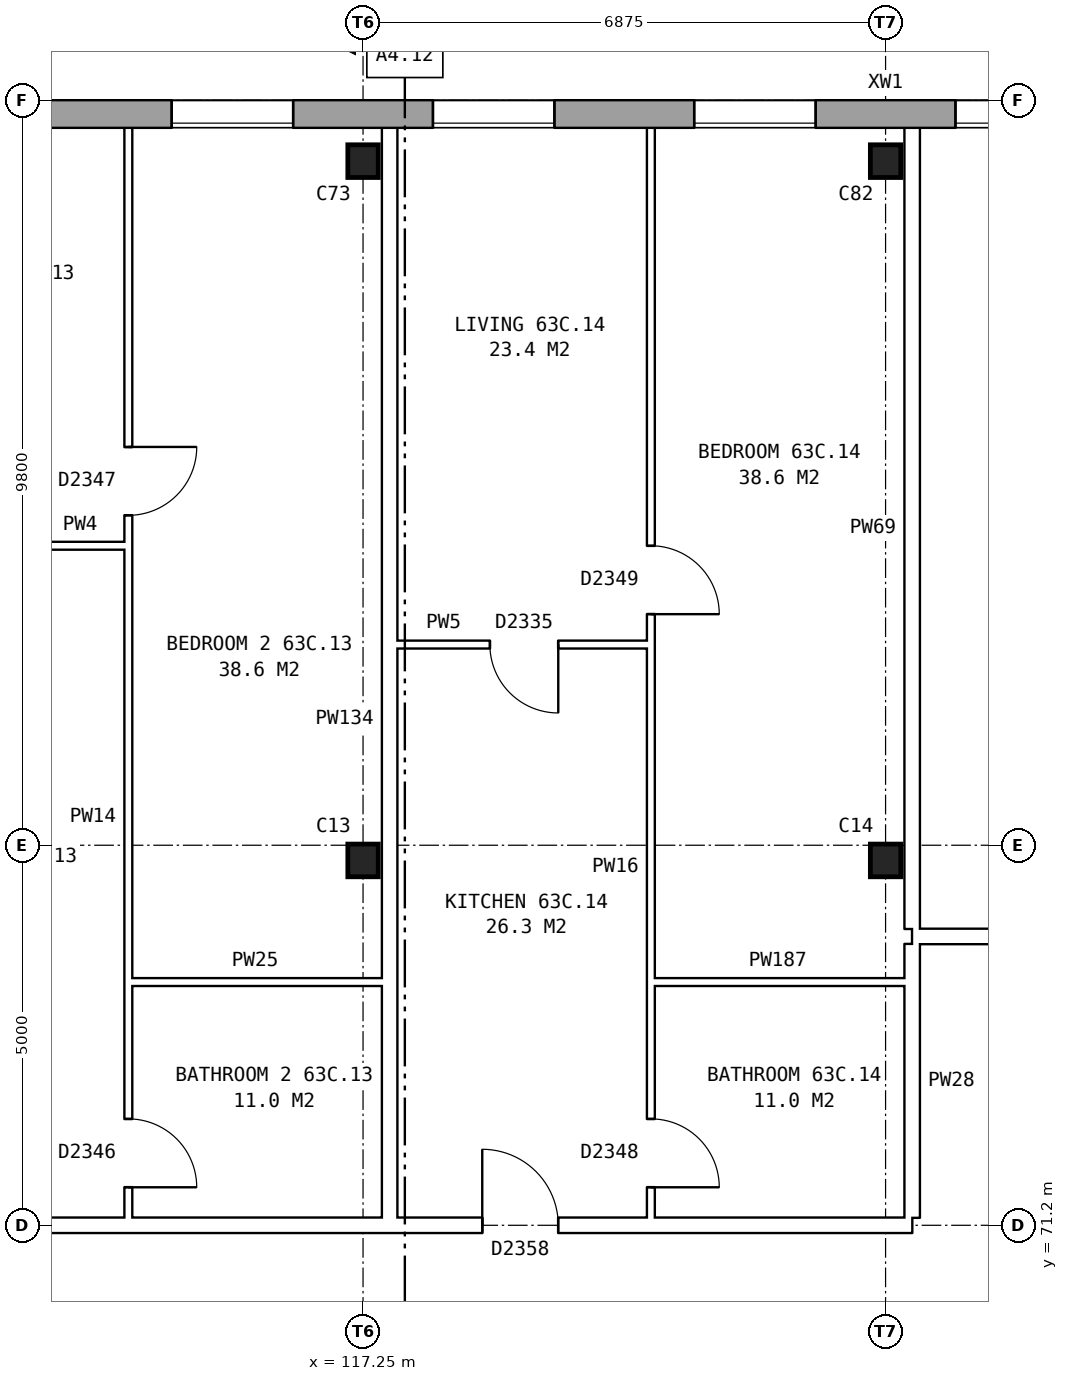
"""IFC4 building model, lengths in metres.
Left out: names, types, materials, properties, quantities, classifications, styles, units other than length and angle.
Written with IfcOpenShell. Run it as: python <this file> out.ifc"""

import sys

from ifc_helpers import new_model, si_unit, direction, frame, frame_2d, origin, origin_2d, place, context, subcontext, project, spatial, rectangle, i_section, extrude, element, fill, save


model = new_model("IFC4")
c1 = context("Model", 3, precision=1e-05, world=origin(), true_north=direction((0.0, 1.0)))
c2 = subcontext(c1, "Body", "Model", "MODEL_VIEW")
j1 = project(units=[si_unit("LENGTHUNIT", "METRE"), si_unit("PLANEANGLEUNIT", "RADIAN")], contexts=[c1])
p1 = place(None, origin())
s1 = spatial("IfcSite", under=j1, at=p1, CompositionType="ELEMENT")
p2 = place(p1, origin())
s2 = spatial("IfcBuilding", under=s1, at=p2, CompositionType="ELEMENT")
p3 = place(p2, frame((0.0, 0.0, 224.5)))
s3 = spatial("IfcBuildingStorey", under=s2, at=p3, CompositionType="ELEMENT", Elevation=224.5)
for number, where, z_axis, x_axis in (
    (1, (117.25, 76.0, 0.0), (0.0, 0.0, 1.0), (1.0, 0.0, 0.0)),
    (2, (124.125, 76.0, 0.0), (0.0, 0.0, 1.0), (1.0, 0.0, 0.0)),
    (3, (117.25, 85.2, 0.0), (0.0, 0.0, 1.0), (1.0, 0.0, 0.0)),
    (4, (124.125, 85.2, 0.0), (0.0, 0.0, 1.0), (1.0, 0.0, 0.0)),
):
    element("IfcColumn", number, at=place(p3, frame(where, z_axis=z_axis, x_axis=x_axis)), inside=s3, PredefinedType="COLUMN", context=c2, shape_type="SweptSolid", body=[
        extrude(i_section(OverallWidth=0.4, OverallDepth=0.43, WebThickness=0.04, FlangeThickness=0.04, at=origin_2d()), origin(), (0.0, 0.0, 1.0), 2.85),
    ])
p4 = place(p3, frame((131.05, 85.82, 0.0), z_axis=(0.0, 0.0, 1.0), x_axis=(-1.0, 0.0, 0.0)))
e5 = element("IfcWall", 5, at=p4, inside=s3, PredefinedType="STANDARD", context=c2, shape_type="SweptSolid", body=[
    extrude(rectangle(XDim=55.1, YDim=0.36, at=frame_2d((27.55, 0.0))), origin(), (0.0, 0.0, 1.0), 2.85),
])
p5 = place(p4, frame((0.969, 0.0, 0.8)))
e6 = element("IfcOpeningElement", 6, at=p5, cuts=e5, PredefinedType="OPENING", context=c2, shape_type="SweptSolid", body=[
    extrude(rectangle(XDim=1.6, YDim=1.8, at=frame_2d((0.8, 0.9))), frame((0.0, 0.19, 0.0), z_axis=(0.0, -1.0, 0.0), x_axis=(1.0, 0.0, 0.0)), (0.0, 0.0, 1.0), 0.38),
])
p6 = place(p4, frame((4.406, 0.0, 0.8)))
e7 = element("IfcOpeningElement", 7, at=p6, cuts=e5, PredefinedType="OPENING", context=c2, shape_type="SweptSolid", body=[
    extrude(rectangle(XDim=1.6, YDim=1.8, at=frame_2d((0.8, 0.9))), frame((0.0, 0.19, 0.0), z_axis=(0.0, -1.0, 0.0), x_axis=(1.0, 0.0, 0.0)), (0.0, 0.0, 1.0), 0.38),
])
p7 = place(p4, frame((7.844, 0.0, 0.8)))
e8 = element("IfcOpeningElement", 8, at=p7, cuts=e5, PredefinedType="OPENING", context=c2, shape_type="SweptSolid", body=[
    extrude(rectangle(XDim=1.6, YDim=1.8, at=frame_2d((0.8, 0.9))), frame((0.0, 0.19, 0.0), z_axis=(0.0, -1.0, 0.0), x_axis=(1.0, 0.0, 0.0)), (0.0, 0.0, 1.0), 0.38),
])
p8 = place(p4, frame((11.281, 0.0, 0.8)))
e9 = element("IfcOpeningElement", 9, at=p8, cuts=e5, PredefinedType="OPENING", context=c2, shape_type="SweptSolid", body=[
    extrude(rectangle(XDim=1.6, YDim=1.8, at=frame_2d((0.8, 0.9))), frame((0.0, 0.19, 0.0), z_axis=(0.0, -1.0, 0.0), x_axis=(1.0, 0.0, 0.0)), (0.0, 0.0, 1.0), 0.38),
])
p9 = place(p4, frame((14.719, 0.0, 0.8)))
e10 = element("IfcOpeningElement", 10, at=p9, cuts=e5, PredefinedType="OPENING", context=c2, shape_type="SweptSolid", body=[
    extrude(rectangle(XDim=1.6, YDim=1.8, at=frame_2d((0.8, 0.9))), frame((0.0, 0.19, 0.0), z_axis=(0.0, -1.0, 0.0), x_axis=(1.0, 0.0, 0.0)), (0.0, 0.0, 1.0), 0.38),
])
p10 = place(p4, frame((18.156, 0.0, 0.8)))
e11 = element("IfcOpeningElement", 11, at=p10, cuts=e5, PredefinedType="OPENING", context=c2, shape_type="SweptSolid", body=[
    extrude(rectangle(XDim=1.6, YDim=1.8, at=frame_2d((0.8, 0.9))), frame((0.0, 0.19, 0.0), z_axis=(0.0, -1.0, 0.0), x_axis=(1.0, 0.0, 0.0)), (0.0, 0.0, 1.0), 0.38),
])
p11 = place(p4, frame((21.594, 0.0, 0.8)))
e12 = element("IfcOpeningElement", 12, at=p11, cuts=e5, PredefinedType="OPENING", context=c2, shape_type="SweptSolid", body=[
    extrude(rectangle(XDim=1.6, YDim=1.8, at=frame_2d((0.8, 0.9))), frame((0.0, 0.19, 0.0), z_axis=(0.0, -1.0, 0.0), x_axis=(1.0, 0.0, 0.0)), (0.0, 0.0, 1.0), 0.38),
])
p12 = place(p4, frame((25.031, 0.0, 0.8)))
e13 = element("IfcOpeningElement", 13, at=p12, cuts=e5, PredefinedType="OPENING", context=c2, shape_type="SweptSolid", body=[
    extrude(rectangle(XDim=1.6, YDim=1.8, at=frame_2d((0.8, 0.9))), frame((0.0, 0.19, 0.0), z_axis=(0.0, -1.0, 0.0), x_axis=(1.0, 0.0, 0.0)), (0.0, 0.0, 1.0), 0.38),
])
p13 = place(p4, frame((28.469, 0.0, 0.8)))
e14 = element("IfcOpeningElement", 14, at=p13, cuts=e5, PredefinedType="OPENING", context=c2, shape_type="SweptSolid", body=[
    extrude(rectangle(XDim=1.6, YDim=1.8, at=frame_2d((0.8, 0.9))), frame((0.0, 0.19, 0.0), z_axis=(0.0, -1.0, 0.0), x_axis=(1.0, 0.0, 0.0)), (0.0, 0.0, 1.0), 0.38),
])
p14 = place(p4, frame((31.906, 0.0, 0.8)))
e15 = element("IfcOpeningElement", 15, at=p14, cuts=e5, PredefinedType="OPENING", context=c2, shape_type="SweptSolid", body=[
    extrude(rectangle(XDim=1.6, YDim=1.8, at=frame_2d((0.8, 0.9))), frame((0.0, 0.19, 0.0), z_axis=(0.0, -1.0, 0.0), x_axis=(1.0, 0.0, 0.0)), (0.0, 0.0, 1.0), 0.38),
])
p15 = place(p4, frame((35.344, 0.0, 0.8)))
e16 = element("IfcOpeningElement", 16, at=p15, cuts=e5, PredefinedType="OPENING", context=c2, shape_type="SweptSolid", body=[
    extrude(rectangle(XDim=1.6, YDim=1.8, at=frame_2d((0.8, 0.9))), frame((0.0, 0.19, 0.0), z_axis=(0.0, -1.0, 0.0), x_axis=(1.0, 0.0, 0.0)), (0.0, 0.0, 1.0), 0.38),
])
p16 = place(p4, frame((38.781, 0.0, 0.8)))
e17 = element("IfcOpeningElement", 17, at=p16, cuts=e5, PredefinedType="OPENING", context=c2, shape_type="SweptSolid", body=[
    extrude(rectangle(XDim=1.6, YDim=1.8, at=frame_2d((0.8, 0.9))), frame((0.0, 0.19, 0.0), z_axis=(0.0, -1.0, 0.0), x_axis=(1.0, 0.0, 0.0)), (0.0, 0.0, 1.0), 0.38),
])
p17 = place(p4, frame((42.219, 0.0, 0.8)))
e18 = element("IfcOpeningElement", 18, at=p17, cuts=e5, PredefinedType="OPENING", context=c2, shape_type="SweptSolid", body=[
    extrude(rectangle(XDim=1.6, YDim=1.8, at=frame_2d((0.8, 0.9))), frame((0.0, 0.19, 0.0), z_axis=(0.0, -1.0, 0.0), x_axis=(1.0, 0.0, 0.0)), (0.0, 0.0, 1.0), 0.38),
])
p18 = place(p4, frame((45.656, 0.0, 0.8)))
e19 = element("IfcOpeningElement", 19, at=p18, cuts=e5, PredefinedType="OPENING", context=c2, shape_type="SweptSolid", body=[
    extrude(rectangle(XDim=1.6, YDim=1.8, at=frame_2d((0.8, 0.9))), frame((0.0, 0.19, 0.0), z_axis=(0.0, -1.0, 0.0), x_axis=(1.0, 0.0, 0.0)), (0.0, 0.0, 1.0), 0.38),
])
p19 = place(p4, frame((49.094, 0.0, 0.8)))
e20 = element("IfcOpeningElement", 20, at=p19, cuts=e5, PredefinedType="OPENING", context=c2, shape_type="SweptSolid", body=[
    extrude(rectangle(XDim=1.6, YDim=1.8, at=frame_2d((0.8, 0.9))), frame((0.0, 0.19, 0.0), z_axis=(0.0, -1.0, 0.0), x_axis=(1.0, 0.0, 0.0)), (0.0, 0.0, 1.0), 0.38),
])
p20 = place(p4, frame((52.531, 0.0, 0.8)))
e21 = element("IfcOpeningElement", 21, at=p20, cuts=e5, PredefinedType="OPENING", context=c2, shape_type="SweptSolid", body=[
    extrude(rectangle(XDim=1.6, YDim=1.8, at=frame_2d((0.8, 0.9))), frame((0.0, 0.19, 0.0), z_axis=(0.0, -1.0, 0.0), x_axis=(1.0, 0.0, 0.0)), (0.0, 0.0, 1.0), 0.38),
])
p21 = place(p3, frame((83.225, 71.2, 0.0), z_axis=(0.0, 0.0, 1.0), x_axis=(1.0, 0.0, 0.0)))
e22 = element("IfcWall", 22, at=p21, inside=s3, PredefinedType="PARTITIONING", context=c2, shape_type="SweptSolid", body=[
    extrude(rectangle(XDim=41.25, YDim=0.2, at=frame_2d((20.625, 0.0))), origin(), (0.0, 0.0, 1.0), 2.85),
])
p22 = place(p21, frame((4.656, 0.0, 0.0)))
e23 = element("IfcOpeningElement", 23, at=p22, cuts=e22, PredefinedType="OPENING", context=c2, shape_type="SweptSolid", body=[
    extrude(rectangle(XDim=1.0, YDim=2.1, at=frame_2d((0.5, 1.05))), frame((0.0, 0.11, 0.0), z_axis=(0.0, -1.0, 0.0), x_axis=(1.0, 0.0, 0.0)), (0.0, 0.0, 1.0), 0.22),
])
p23 = place(p21, frame((11.531, 0.0, 0.0)))
e24 = element("IfcOpeningElement", 24, at=p23, cuts=e22, PredefinedType="OPENING", context=c2, shape_type="SweptSolid", body=[
    extrude(rectangle(XDim=1.0, YDim=2.1, at=frame_2d((0.5, 1.05))), frame((0.0, 0.11, 0.0), z_axis=(0.0, -1.0, 0.0), x_axis=(1.0, 0.0, 0.0)), (0.0, 0.0, 1.0), 0.22),
])
p24 = place(p21, frame((18.406, 0.0, 0.0)))
e25 = element("IfcOpeningElement", 25, at=p24, cuts=e22, PredefinedType="OPENING", context=c2, shape_type="SweptSolid", body=[
    extrude(rectangle(XDim=1.0, YDim=2.1, at=frame_2d((0.5, 1.05))), frame((0.0, 0.11, 0.0), z_axis=(0.0, -1.0, 0.0), x_axis=(1.0, 0.0, 0.0)), (0.0, 0.0, 1.0), 0.22),
])
p25 = place(p21, frame((28.719, 0.0, 0.0)))
e26 = element("IfcOpeningElement", 26, at=p25, cuts=e22, PredefinedType="OPENING", context=c2, shape_type="SweptSolid", body=[
    extrude(rectangle(XDim=1.0, YDim=2.1, at=frame_2d((0.5, 1.05))), frame((0.0, 0.11, 0.0), z_axis=(0.0, -1.0, 0.0), x_axis=(1.0, 0.0, 0.0)), (0.0, 0.0, 1.0), 0.22),
])
p26 = place(p21, frame((35.594, 0.0, 0.0)))
e27 = element("IfcOpeningElement", 27, at=p26, cuts=e22, PredefinedType="OPENING", context=c2, shape_type="SweptSolid", body=[
    extrude(rectangle(XDim=1.0, YDim=2.1, at=frame_2d((0.5, 1.05))), frame((0.0, 0.11, 0.0), z_axis=(0.0, -1.0, 0.0), x_axis=(1.0, 0.0, 0.0)), (0.0, 0.0, 1.0), 0.22),
])
for number, where, z_axis, x_axis in (
    (28, (114.162, 74.4, 0.0), (0.0, 0.0, 1.0), (1.0, 0.0, 0.0)),
    (29, (121.037, 74.4, 0.0), (0.0, 0.0, 1.0), (1.0, 0.0, 0.0)),
):
    element("IfcWall", number, at=place(p3, frame(where, z_axis=z_axis, x_axis=x_axis)), inside=s3, PredefinedType="PARTITIONING", context=c2, shape_type="SweptSolid", body=[
        extrude(rectangle(XDim=3.338, YDim=0.1, at=frame_2d((1.669, 0.0))), origin(), (0.0, 0.0, 1.0), 2.85),
    ])
p27 = place(p3, frame((124.475, 75.0, 0.0), z_axis=(0.0, 0.0, 1.0), x_axis=(1.0, 0.0, 0.0)))
e30 = element("IfcWall", 30, at=p27, inside=s3, PredefinedType="PARTITIONING", context=c2, shape_type="SweptSolid", body=[
    extrude(rectangle(XDim=6.885, YDim=0.2, at=frame_2d((3.442, 0.0))), origin(), (0.0, 0.0, 1.0), 2.85),
])
p28 = place(p27, frame((2.992, 0.0, 0.0)))
e31 = element("IfcOpeningElement", 31, at=p28, cuts=e30, PredefinedType="OPENING", context=c2, shape_type="SweptSolid", body=[
    extrude(rectangle(XDim=0.9, YDim=2.1, at=frame_2d((0.45, 1.05))), frame((0.0, 0.11, 0.0), z_axis=(0.0, -1.0, 0.0), x_axis=(1.0, 0.0, 0.0)), (0.0, 0.0, 1.0), 0.22),
])
p29 = place(p3, frame((117.7, 78.84, 0.0), z_axis=(0.0, 0.0, 1.0), x_axis=(1.0, 0.0, 0.0)))
e32 = element("IfcWall", 32, at=p29, inside=s3, PredefinedType="PARTITIONING", context=c2, shape_type="SweptSolid", body=[
    extrude(rectangle(XDim=3.337, YDim=0.1, at=frame_2d((1.668, 0.0))), origin(), (0.0, 0.0, 1.0), 2.85),
])
p30 = place(p29, frame((1.219, 0.0, 0.0)))
e33 = element("IfcOpeningElement", 33, at=p30, cuts=e32, PredefinedType="OPENING", context=c2, shape_type="SweptSolid", body=[
    extrude(rectangle(XDim=0.9, YDim=2.1, at=frame_2d((0.45, 1.05))), frame((0.0, 0.06, 0.0), z_axis=(0.0, -1.0, 0.0), x_axis=(1.0, 0.0, 0.0)), (0.0, 0.0, 1.0), 0.12),
])
p31 = place(p3, frame((110.725, 80.14, 0.0), z_axis=(0.0, 0.0, 1.0), x_axis=(1.0, 0.0, 0.0)))
e34 = element("IfcWall", 34, at=p31, inside=s3, PredefinedType="PARTITIONING", context=c2, shape_type="SweptSolid", body=[
    extrude(rectangle(XDim=3.437, YDim=0.1, at=frame_2d((1.719, 0.0))), origin(), (0.0, 0.0, 1.0), 2.85),
])
p32 = place(p31, frame((1.269, 0.0, 0.0)))
e35 = element("IfcOpeningElement", 35, at=p32, cuts=e34, PredefinedType="OPENING", context=c2, shape_type="SweptSolid", body=[
    extrude(rectangle(XDim=0.9, YDim=2.1, at=frame_2d((0.45, 1.05))), frame((0.0, 0.06, 0.0), z_axis=(0.0, -1.0, 0.0), x_axis=(1.0, 0.0, 0.0)), (0.0, 0.0, 1.0), 0.12),
])
p33 = place(p3, frame((114.162, 71.3, 0.0), z_axis=(0.0, 0.0, 1.0), x_axis=(0.0, 1.0, 0.0)))
e36 = element("IfcWall", 36, at=p33, inside=s3, PredefinedType="PARTITIONING", context=c2, shape_type="SweptSolid", body=[
    extrude(rectangle(XDim=14.34, YDim=0.1, at=frame_2d((7.17, 0.0))), origin(), (0.0, 0.0, 1.0), 2.85),
])
p34 = place(p33, frame((9.24, 0.0, 0.0)))
e37 = element("IfcOpeningElement", 37, at=p34, cuts=e36, PredefinedType="OPENING", context=c2, shape_type="SweptSolid", body=[
    extrude(rectangle(XDim=0.9, YDim=2.1, at=frame_2d((0.45, 1.05))), frame((0.0, 0.06, 0.0), z_axis=(0.0, -1.0, 0.0), x_axis=(1.0, 0.0, 0.0)), (0.0, 0.0, 1.0), 0.12),
])
p35 = place(p33, frame((0.4, 0.0, 0.0)))
e38 = element("IfcOpeningElement", 38, at=p35, cuts=e36, PredefinedType="OPENING", context=c2, shape_type="SweptSolid", body=[
    extrude(rectangle(XDim=0.9, YDim=2.1, at=frame_2d((0.45, 1.05))), frame((0.0, 0.06, 0.0), z_axis=(0.0, -1.0, 0.0), x_axis=(1.0, 0.0, 0.0)), (0.0, 0.0, 1.0), 0.12),
])
p36 = place(p3, frame((117.6, 71.3, 0.0), z_axis=(0.0, 0.0, 1.0), x_axis=(0.0, 1.0, 0.0)))
e39 = element("IfcWall", 39, at=p36, inside=s3, PredefinedType="PARTITIONING", context=c2, shape_type="SweptSolid", body=[
    extrude(rectangle(XDim=14.34, YDim=0.2, at=frame_2d((7.17, 0.0))), origin(), (0.0, 0.0, 1.0), 2.85),
])
p37 = place(p3, frame((121.037, 71.3, 0.0), z_axis=(0.0, 0.0, 1.0), x_axis=(0.0, 1.0, 0.0)))
e40 = element("IfcWall", 40, at=p37, inside=s3, PredefinedType="PARTITIONING", context=c2, shape_type="SweptSolid", body=[
    extrude(rectangle(XDim=14.34, YDim=0.1, at=frame_2d((7.17, 0.0))), origin(), (0.0, 0.0, 1.0), 2.85),
])
p38 = place(p37, frame((7.94, 0.0, 0.0)))
e41 = element("IfcOpeningElement", 41, at=p38, cuts=e40, PredefinedType="OPENING", context=c2, shape_type="SweptSolid", body=[
    extrude(rectangle(XDim=0.9, YDim=2.1, at=frame_2d((0.45, 1.05))), frame((0.0, 0.06, 0.0), z_axis=(0.0, -1.0, 0.0), x_axis=(1.0, 0.0, 0.0)), (0.0, 0.0, 1.0), 0.12),
])
p39 = place(p37, frame((0.4, 0.0, 0.0)))
e42 = element("IfcOpeningElement", 42, at=p39, cuts=e40, PredefinedType="OPENING", context=c2, shape_type="SweptSolid", body=[
    extrude(rectangle(XDim=0.9, YDim=2.1, at=frame_2d((0.45, 1.05))), frame((0.0, 0.06, 0.0), z_axis=(0.0, -1.0, 0.0), x_axis=(1.0, 0.0, 0.0)), (0.0, 0.0, 1.0), 0.12),
])
p40 = place(p3, frame((124.475, 71.3, 0.0), z_axis=(0.0, 0.0, 1.0), x_axis=(0.0, 1.0, 0.0)))
e43 = element("IfcWall", 43, at=p40, inside=s3, PredefinedType="PARTITIONING", context=c2, shape_type="SweptSolid", body=[
    extrude(rectangle(XDim=3.6, YDim=0.2, at=frame_2d((1.8, 0.0))), origin(), (0.0, 0.0, 1.0), 2.85),
])
p41 = place(p3, frame((124.475, 75.1, 0.0), z_axis=(0.0, 0.0, 1.0), x_axis=(0.0, 1.0, 0.0)))
e44 = element("IfcWall", 44, at=p41, inside=s3, PredefinedType="PARTITIONING", context=c2, shape_type="SweptSolid", body=[
    extrude(rectangle(XDim=10.54, YDim=0.2, at=frame_2d((5.27, 0.0))), origin(), (0.0, 0.0, 1.0), 2.85),
])
p42 = place(p6, origin())
e45 = element("IfcWindow", 45, at=p42, inside=s3, PartitioningType="SINGLE_PANEL", PredefinedType="WINDOW", context=c2, shape_type="SweptSolid", body=[
    extrude(rectangle(XDim=1.6, YDim=1.8, at=frame_2d((0.8, 0.9))), frame((0.0, 0.15, 0.0), z_axis=(0.0, -1.0, 0.0), x_axis=(1.0, 0.0, 0.0)), (0.0, 0.0, 1.0), 0.06),
])
fill(e7, e45)
p43 = place(p7, origin())
e46 = element("IfcWindow", 46, at=p43, inside=s3, PartitioningType="SINGLE_PANEL", PredefinedType="WINDOW", context=c2, shape_type="SweptSolid", body=[
    extrude(rectangle(XDim=1.6, YDim=1.8, at=frame_2d((0.8, 0.9))), frame((0.0, 0.15, 0.0), z_axis=(0.0, -1.0, 0.0), x_axis=(1.0, 0.0, 0.0)), (0.0, 0.0, 1.0), 0.06),
])
fill(e8, e46)
p44 = place(p8, origin())
e47 = element("IfcWindow", 47, at=p44, inside=s3, PartitioningType="SINGLE_PANEL", PredefinedType="WINDOW", context=c2, shape_type="SweptSolid", body=[
    extrude(rectangle(XDim=1.6, YDim=1.8, at=frame_2d((0.8, 0.9))), frame((0.0, 0.15, 0.0), z_axis=(0.0, -1.0, 0.0), x_axis=(1.0, 0.0, 0.0)), (0.0, 0.0, 1.0), 0.06),
])
fill(e9, e47)
p45 = place(p9, origin())
e48 = element("IfcWindow", 48, at=p45, inside=s3, PartitioningType="SINGLE_PANEL", PredefinedType="WINDOW", context=c2, shape_type="SweptSolid", body=[
    extrude(rectangle(XDim=1.6, YDim=1.8, at=frame_2d((0.8, 0.9))), frame((0.0, 0.15, 0.0), z_axis=(0.0, -1.0, 0.0), x_axis=(1.0, 0.0, 0.0)), (0.0, 0.0, 1.0), 0.06),
])
fill(e10, e48)
p46 = place(p34, frame((0.9, 0.0, 0.0), z_axis=(0.0, 0.0, 1.0), x_axis=(-1.0, 0.0, 0.0)))
e49 = element("IfcDoor", 49, at=p46, inside=s3, OperationType="SINGLE_SWING_LEFT", PredefinedType="DOOR", context=c2, shape_type="SweptSolid", body=[
    extrude(rectangle(XDim=0.9, YDim=2.1, at=frame_2d((0.45, 1.05))), frame((0.0, 0.025, 0.0), z_axis=(0.0, -1.0, 0.0), x_axis=(1.0, 0.0, 0.0)), (0.0, 0.0, 1.0), 0.05),
])
fill(e37, e49)
p47 = place(p35, frame((0.9, 0.0, 0.0), z_axis=(0.0, 0.0, 1.0), x_axis=(-1.0, 0.0, 0.0)))
e50 = element("IfcDoor", 50, at=p47, inside=s3, OperationType="SINGLE_SWING_RIGHT", PredefinedType="DOOR", context=c2, shape_type="SweptSolid", body=[
    extrude(rectangle(XDim=0.9, YDim=2.1, at=frame_2d((0.45, 1.05))), frame((0.0, 0.025, 0.0), z_axis=(0.0, -1.0, 0.0), x_axis=(1.0, 0.0, 0.0)), (0.0, 0.0, 1.0), 0.05),
])
fill(e38, e50)
p48 = place(p38, frame((0.9, 0.0, 0.0), z_axis=(0.0, 0.0, 1.0), x_axis=(-1.0, 0.0, 0.0)))
e51 = element("IfcDoor", 51, at=p48, inside=s3, OperationType="SINGLE_SWING_RIGHT", PredefinedType="DOOR", context=c2, shape_type="SweptSolid", body=[
    extrude(rectangle(XDim=0.9, YDim=2.1, at=frame_2d((0.45, 1.05))), frame((0.0, 0.025, 0.0), z_axis=(0.0, -1.0, 0.0), x_axis=(1.0, 0.0, 0.0)), (0.0, 0.0, 1.0), 0.05),
])
fill(e41, e51)
p49 = place(p26, origin())
e52 = element("IfcDoor", 52, at=p49, inside=s3, OperationType="SINGLE_SWING_LEFT", PredefinedType="DOOR", context=c2, shape_type="SweptSolid", body=[
    extrude(rectangle(XDim=1.0, YDim=2.1, at=frame_2d((0.5, 1.05))), frame((0.0, 0.025, 0.0), z_axis=(0.0, -1.0, 0.0), x_axis=(1.0, 0.0, 0.0)), (0.0, 0.0, 1.0), 0.05),
])
fill(e27, e52)
p50 = place(p30, frame((0.9, 0.0, 0.0), z_axis=(0.0, 0.0, 1.0), x_axis=(-1.0, 0.0, 0.0)))
e53 = element("IfcDoor", 53, at=p50, inside=s3, OperationType="SINGLE_SWING_LEFT", PredefinedType="DOOR", context=c2, shape_type="SweptSolid", body=[
    extrude(rectangle(XDim=0.9, YDim=2.1, at=frame_2d((0.45, 1.05))), frame((0.0, 0.025, 0.0), z_axis=(0.0, -1.0, 0.0), x_axis=(1.0, 0.0, 0.0)), (0.0, 0.0, 1.0), 0.05),
])
fill(e33, e53)
p51 = place(p39, frame((0.9, 0.0, 0.0), z_axis=(0.0, 0.0, 1.0), x_axis=(-1.0, 0.0, 0.0)))
e54 = element("IfcDoor", 54, at=p51, inside=s3, OperationType="SINGLE_SWING_RIGHT", PredefinedType="DOOR", context=c2, shape_type="SweptSolid", body=[
    extrude(rectangle(XDim=0.9, YDim=2.1, at=frame_2d((0.45, 1.05))), frame((0.0, 0.025, 0.0), z_axis=(0.0, -1.0, 0.0), x_axis=(1.0, 0.0, 0.0)), (0.0, 0.0, 1.0), 0.05),
])
fill(e42, e54)
save(model, sys.argv[1])
